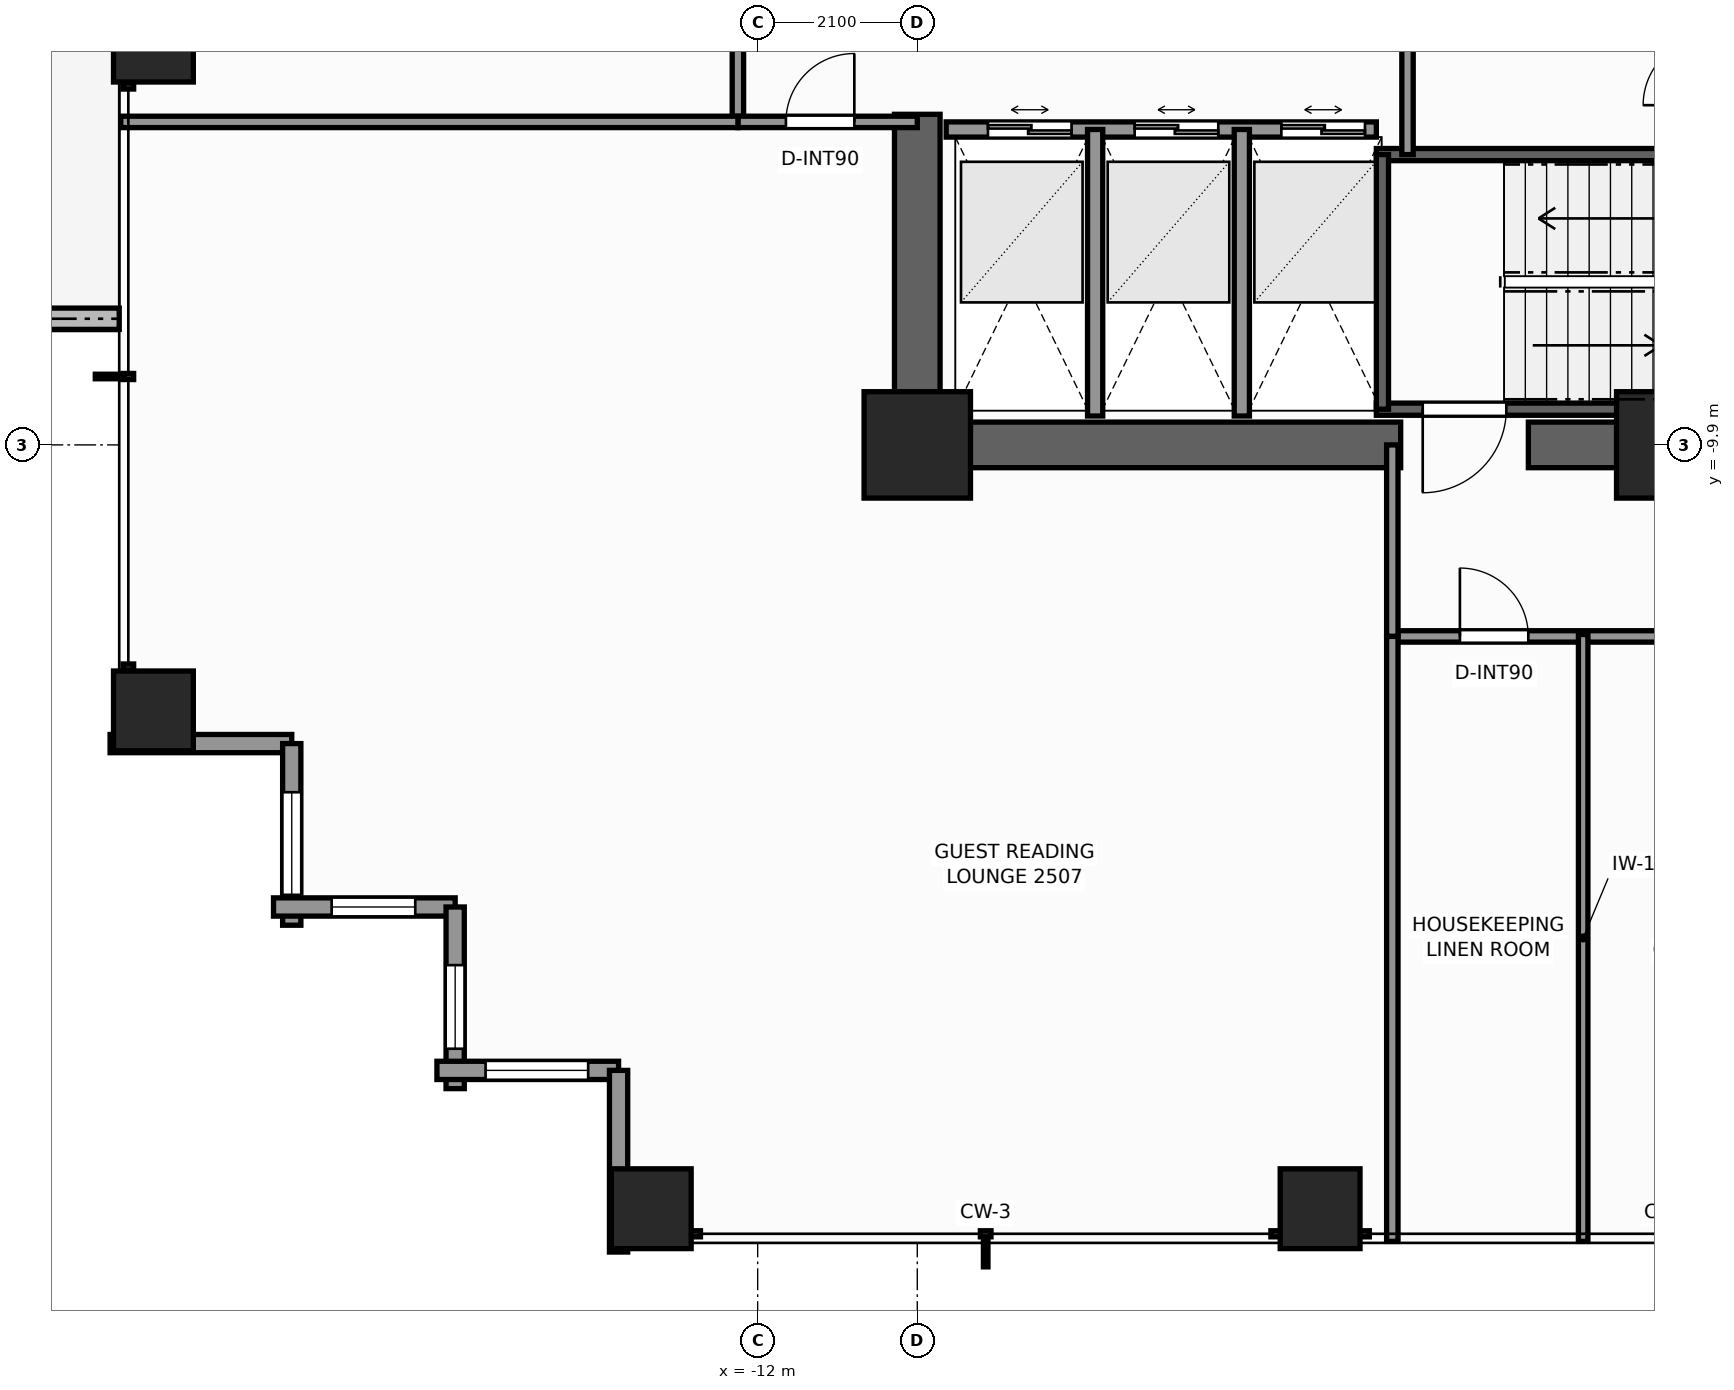
"""IFC4 building model, lengths in metres.
Left out: names, types, materials, properties, quantities, classifications, styles, units other than length and angle.
Written with IfcOpenShell. Run it as: python <this file> out.ifc"""

import sys

from ifc_helpers import new_model, si_unit, direction, frame, frame_2d, origin, origin_2d, place, context, subcontext, project, spatial, rectangle, extrude, element, fill, save


model = new_model("IFC4")
c1 = context("Model", 3, precision=1e-05, world=origin(), true_north=direction((0.0, 1.0)))
c2 = subcontext(c1, "Body", "Model", "MODEL_VIEW")
j1 = project(units=[si_unit("LENGTHUNIT", "METRE"), si_unit("PLANEANGLEUNIT", "RADIAN")], contexts=[c1])
p1 = place(None, origin())
s1 = spatial("IfcSite", under=j1, at=p1, CompositionType="ELEMENT")
p2 = place(p1, origin())
s2 = spatial("IfcBuilding", under=s1, at=p2, CompositionType="ELEMENT")
p3 = place(p2, frame((0.0, 0.0, 88.7)))
s3 = spatial("IfcBuildingStorey", under=s2, at=p3, CompositionType="ELEMENT", Elevation=88.7)
p4 = place(p3, frame((10.2, -9.9, 0.0), z_axis=(0.0, 0.0, 1.0), x_axis=(-1.0, 0.0, 0.0)))
e1 = element("IfcWall", 1, at=p4, inside=s3, PredefinedType="SHEAR", context=c2, shape_type="SweptSolid", body=[
    extrude(rectangle(XDim=12.06, YDim=0.6, at=frame_2d((6.03, 0.0))), origin(), (0.0, 0.0, 1.0), 3.3),
])
p5 = place(p3, frame((-3.54, -9.9, 0.0), z_axis=(0.0, 0.0, 1.0), x_axis=(-1.0, 0.0, 0.0)))
e2 = element("IfcWall", 2, at=p5, inside=s3, PredefinedType="SHEAR", context=c2, shape_type="SweptSolid", body=[
    extrude(rectangle(XDim=6.66, YDim=0.6, at=frame_2d((3.33, 0.0))), origin(), (0.0, 0.0, 1.0), 3.3),
])
p6 = place(p3, frame((-9.9, -9.6, 0.0), z_axis=(0.0, 0.0, 1.0), x_axis=(0.0, 1.0, 0.0)))
e3 = element("IfcWall", 3, at=p6, inside=s3, PredefinedType="SHEAR", context=c2, shape_type="SweptSolid", body=[
    extrude(rectangle(XDim=4.05, YDim=0.6, at=frame_2d((2.025, 0.0))), origin(), (0.0, 0.0, 1.0), 3.3),
])
for number, where, z_axis, x_axis in (
    (4, (-9.9, -9.9, 0.0), (0.0, 0.0, 1.0), (1.0, 0.0, 0.0)),
    (5, (0.0, -9.9, 0.0), (0.0, 0.0, 1.0), (1.0, 0.0, 0.0)),
):
    element("IfcColumn", number, at=place(p3, frame(where, z_axis=z_axis, x_axis=x_axis)), inside=s3, PredefinedType="COLUMN", context=c2, shape_type="SweptSolid", body=[
        extrude(rectangle(XDim=1.4, YDim=1.4, at=origin_2d()), origin(), (0.0, 0.0, 1.0), 3.3),
    ])
for number, where, z_axis, x_axis in (
    (6, (-13.4, -19.95, 0.0), (0.0, 0.0, 1.0), (1.0, 0.0, 0.0)),
    (7, (-4.6, -19.95, 0.0), (0.0, 0.0, 1.0), (1.0, 0.0, 0.0)),
    (8, (-19.95, -13.4, 0.0), (0.0, 0.0, 1.0), (1.0, 0.0, 0.0)),
    (9, (-19.95, -4.6, 0.0), (0.0, 0.0, 1.0), (1.0, 0.0, 0.0)),
):
    element("IfcColumn", number, at=place(p3, frame(where, z_axis=z_axis, x_axis=x_axis)), inside=s3, PredefinedType="COLUMN", context=c2, shape_type="SweptSolid", body=[
        extrude(rectangle(XDim=1.05, YDim=1.05, at=origin_2d()), origin(), (0.0, 0.0, 1.0), 3.3),
    ])
p7 = place(p3, frame((-21.66, -8.24, -0.04), z_axis=(0.0, 0.0, 1.0), x_axis=(1.0, 0.0, 0.0)))
e10 = element("IfcWall", 10, at=p7, inside=s3, PredefinedType="PARAPET", context=c2, shape_type="SweptSolid", body=[
    extrude(rectangle(XDim=1.26, YDim=0.28, at=frame_2d((0.63, 0.0))), origin(), (0.0, 0.0, 1.0), 0.42),
])
p8 = place(p3, frame((-18.13, -13.83, 0.0), z_axis=(0.0, 0.0, 1.0), x_axis=(-1.0, 0.0, 0.0)))
e11 = element("IfcWall", 11, at=p8, inside=s3, PredefinedType="STANDARD", context=c2, shape_type="SweptSolid", body=[
    extrude(rectangle(XDim=2.39, YDim=0.24, at=frame_2d((1.195, 0.0))), origin(), (0.0, 0.0, 1.0), 2.459),
])
p9 = place(p3, frame((-18.13, -16.22, 0.0), z_axis=(0.0, 0.0, 1.0), x_axis=(0.0, 1.0, 0.0)))
e12 = element("IfcWall", 12, at=p9, inside=s3, PredefinedType="STANDARD", context=c2, shape_type="SweptSolid", body=[
    extrude(rectangle(XDim=2.39, YDim=0.24, at=frame_2d((1.195, 0.0))), origin(), (0.0, 0.0, 1.0), 2.459),
])
p10 = place(p9, frame((0.4, 0.0, 0.65)))
e13 = element("IfcOpeningElement", 13, at=p10, cuts=e12, PredefinedType="OPENING", context=c2, shape_type="SweptSolid", body=[
    extrude(rectangle(XDim=1.35, YDim=1.55, at=frame_2d((0.675, 0.775))), frame((0.0, 0.13, 0.0), z_axis=(0.0, -1.0, 0.0), x_axis=(1.0, 0.0, 0.0)), (0.0, 0.0, 1.0), 0.26),
])
p11 = place(p3, frame((-15.98, -15.98, 0.0), z_axis=(0.0, 0.0, 1.0), x_axis=(-1.0, 0.0, 0.0)))
e14 = element("IfcWall", 14, at=p11, inside=s3, PredefinedType="STANDARD", context=c2, shape_type="SweptSolid", body=[
    extrude(rectangle(XDim=2.39, YDim=0.24, at=frame_2d((1.195, 0.0))), origin(), (0.0, 0.0, 1.0), 2.459),
])
p12 = place(p11, frame((0.525, 0.0, 0.65)))
e15 = element("IfcOpeningElement", 15, at=p12, cuts=e14, PredefinedType="OPENING", context=c2, shape_type="SweptSolid", body=[
    extrude(rectangle(XDim=1.1, YDim=1.45, at=frame_2d((0.55, 0.725))), frame((0.0, 0.13, 0.0), z_axis=(0.0, -1.0, 0.0), x_axis=(1.0, 0.0, 0.0)), (0.0, 0.0, 1.0), 0.26),
])
p13 = place(p3, frame((-15.98, -18.37, 0.0), z_axis=(0.0, 0.0, 1.0), x_axis=(0.0, 1.0, 0.0)))
e16 = element("IfcWall", 16, at=p13, inside=s3, PredefinedType="STANDARD", context=c2, shape_type="SweptSolid", body=[
    extrude(rectangle(XDim=2.39, YDim=0.24, at=frame_2d((1.195, 0.0))), origin(), (0.0, 0.0, 1.0), 2.459),
])
p14 = place(p13, frame((0.525, 0.0, 0.65)))
e17 = element("IfcOpeningElement", 17, at=p14, cuts=e16, PredefinedType="OPENING", context=c2, shape_type="SweptSolid", body=[
    extrude(rectangle(XDim=1.1, YDim=1.45, at=frame_2d((0.55, 0.725))), frame((0.0, 0.13, 0.0), z_axis=(0.0, -1.0, 0.0), x_axis=(1.0, 0.0, 0.0)), (0.0, 0.0, 1.0), 0.26),
])
p15 = place(p3, frame((-13.83, -18.13, 0.0), z_axis=(0.0, 0.0, 1.0), x_axis=(-1.0, 0.0, 0.0)))
e18 = element("IfcWall", 18, at=p15, inside=s3, PredefinedType="STANDARD", context=c2, shape_type="SweptSolid", body=[
    extrude(rectangle(XDim=2.39, YDim=0.24, at=frame_2d((1.195, 0.0))), origin(), (0.0, 0.0, 1.0), 2.459),
])
p16 = place(p15, frame((0.4, 0.0, 0.65)))
e19 = element("IfcOpeningElement", 19, at=p16, cuts=e18, PredefinedType="OPENING", context=c2, shape_type="SweptSolid", body=[
    extrude(rectangle(XDim=1.35, YDim=1.55, at=frame_2d((0.675, 0.775))), frame((0.0, 0.13, 0.0), z_axis=(0.0, -1.0, 0.0), x_axis=(1.0, 0.0, 0.0)), (0.0, 0.0, 1.0), 0.26),
])
p17 = place(p3, frame((-13.83, -20.52, 0.0), z_axis=(0.0, 0.0, 1.0), x_axis=(0.0, 1.0, 0.0)))
e20 = element("IfcWall", 20, at=p17, inside=s3, PredefinedType="STANDARD", context=c2, shape_type="SweptSolid", body=[
    extrude(rectangle(XDim=2.39, YDim=0.24, at=frame_2d((1.195, 0.0))), origin(), (0.0, 0.0, 1.0), 2.459),
])
p18 = place(p3, frame((3.86, -9.43, 0.0), z_axis=(0.0, 0.0, 1.0), x_axis=(-1.0, 0.0, 0.0)))
e21 = element("IfcWall", 21, at=p18, inside=s3, PredefinedType="SHEAR", context=c2, shape_type="SweptSolid", body=[
    extrude(rectangle(XDim=7.72, YDim=0.16, at=frame_2d((3.86, 0.0))), origin(), (0.0, 0.0, 1.0), 3.3),
])
p19 = place(p18, frame((6.01, 0.0, 0.0)))
e22 = element("IfcOpeningElement", 22, at=p19, cuts=e21, PredefinedType="OPENING", context=c2, shape_type="SweptSolid", body=[
    extrude(rectangle(XDim=1.1, YDim=2.2, at=frame_2d((0.55, 1.1))), frame((0.0, 0.09, 0.0), z_axis=(0.0, -1.0, 0.0), x_axis=(1.0, 0.0, 0.0)), (0.0, 0.0, 1.0), 0.18),
])
p20 = place(p3, frame((-3.86, -6.08, 0.0), z_axis=(0.0, 0.0, 1.0), x_axis=(1.0, 0.0, 0.0)))
e23 = element("IfcWall", 23, at=p20, inside=s3, PredefinedType="SHEAR", context=c2, shape_type="SweptSolid", body=[
    extrude(rectangle(XDim=7.72, YDim=0.16, at=frame_2d((3.86, 0.0))), origin(), (0.0, 0.0, 1.0), 3.3),
])
p21 = place(p3, frame((-3.78, -9.43, 0.0), z_axis=(0.0, 0.0, 1.0), x_axis=(0.0, 1.0, 0.0)))
e24 = element("IfcWall", 24, at=p21, inside=s3, PredefinedType="SHEAR", context=c2, shape_type="SweptSolid", body=[
    extrude(rectangle(XDim=3.35, YDim=0.16, at=frame_2d((1.675, 0.0))), origin(), (0.0, 0.0, 1.0), 3.3),
])
p22 = place(p3, frame((-9.52, -5.75, 0.0), z_axis=(0.0, 0.0, 1.0), x_axis=(1.0, 0.0, 0.0)))
e25 = element("IfcWall", 25, at=p22, inside=s3, PredefinedType="SOLIDWALL", context=c2, shape_type="SweptSolid", body=[
    extrude(rectangle(XDim=5.66, YDim=0.2, at=frame_2d((2.83, 0.0))), origin(), (0.0, 0.0, 1.0), 3.08),
])
p23 = place(p22, frame((0.55, 0.0, 0.0)))
e26 = element("IfcOpeningElement", 26, at=p23, cuts=e25, PredefinedType="OPENING", context=c2, shape_type="SweptSolid", body=[
    extrude(rectangle(XDim=1.1, YDim=2.2, at=frame_2d((0.55, 1.1))), frame((0.0, 0.11, 0.0), z_axis=(0.0, -1.0, 0.0), x_axis=(1.0, 0.0, 0.0)), (0.0, 0.0, 1.0), 0.22),
])
p24 = place(p22, frame((2.48, 0.0, 0.0)))
e27 = element("IfcOpeningElement", 27, at=p24, cuts=e25, PredefinedType="OPENING", context=c2, shape_type="SweptSolid", body=[
    extrude(rectangle(XDim=1.1, YDim=2.2, at=frame_2d((0.55, 1.1))), frame((0.0, 0.11, 0.0), z_axis=(0.0, -1.0, 0.0), x_axis=(1.0, 0.0, 0.0)), (0.0, 0.0, 1.0), 0.22),
])
p25 = place(p22, frame((4.41, 0.0, 0.0)))
e28 = element("IfcOpeningElement", 28, at=p25, cuts=e25, PredefinedType="OPENING", context=c2, shape_type="SweptSolid", body=[
    extrude(rectangle(XDim=1.1, YDim=2.2, at=frame_2d((0.55, 1.1))), frame((0.0, 0.11, 0.0), z_axis=(0.0, -1.0, 0.0), x_axis=(1.0, 0.0, 0.0)), (0.0, 0.0, 1.0), 0.22),
])
for number, where, z_axis, x_axis in (
    (29, (-7.56, -9.52, 0.0), (0.0, 0.0, 1.0), (0.0, 1.0, 0.0)),
    (30, (-5.63, -9.52, 0.0), (0.0, 0.0, 1.0), (0.0, 1.0, 0.0)),
):
    element("IfcWall", number, at=place(p3, frame(where, z_axis=z_axis, x_axis=x_axis)), inside=s3, PredefinedType="SOLIDWALL", context=c2, shape_type="SweptSolid", body=[
        extrude(rectangle(XDim=3.77, YDim=0.2, at=frame_2d((1.885, 0.0))), origin(), (0.0, 0.0, 1.0), 3.08),
    ])
p26 = place(p3, frame((-3.45, -6.08, 0.0), z_axis=(0.0, 0.0, 1.0), x_axis=(0.0, 1.0, 0.0)))
e31 = element("IfcWall", 31, at=p26, inside=s3, PredefinedType="PARTITIONING", context=c2, shape_type="SweptSolid", body=[
    extrude(rectangle(XDim=2.36, YDim=0.15, at=frame_2d((1.18, 0.0))), origin(), (0.0, 0.0, 1.0), 3.08),
])
p27 = place(p3, frame((-3.65, -12.42, 0.0), z_axis=(0.0, 0.0, 1.0), x_axis=(1.0, 0.0, 0.0)))
e32 = element("IfcWall", 32, at=p27, inside=s3, PredefinedType="PARTITIONING", context=c2, shape_type="SweptSolid", body=[
    extrude(rectangle(XDim=16.07, YDim=0.15, at=frame_2d((8.035, 0.0))), origin(), (0.0, 0.0, 1.0), 2.292),
])
p28 = place(p27, frame((0.889, 0.0, 0.0)))
e33 = element("IfcOpeningElement", 33, at=p28, cuts=e32, PredefinedType="OPENING", context=c2, shape_type="SweptSolid", body=[
    extrude(rectangle(XDim=0.9, YDim=2.06, at=frame_2d((0.45, 1.03))), frame((0.0, 0.085, 0.0), z_axis=(0.0, -1.0, 0.0), x_axis=(1.0, 0.0, 0.0)), (0.0, 0.0, 1.0), 0.17),
])
p29 = place(p27, frame((4.722, 0.0, 0.0)))
e34 = element("IfcOpeningElement", 34, at=p29, cuts=e32, PredefinedType="OPENING", context=c2, shape_type="SweptSolid", body=[
    extrude(rectangle(XDim=0.95, YDim=2.06, at=frame_2d((0.475, 1.03))), frame((0.0, 0.085, 0.0), z_axis=(0.0, -1.0, 0.0), x_axis=(1.0, 0.0, 0.0)), (0.0, 0.0, 1.0), 0.17),
])
p30 = place(p27, frame((9.415, 0.0, 0.0)))
e35 = element("IfcOpeningElement", 35, at=p30, cuts=e32, PredefinedType="OPENING", context=c2, shape_type="SweptSolid", body=[
    extrude(rectangle(XDim=0.9, YDim=2.06, at=frame_2d((0.45, 1.03))), frame((0.0, 0.085, 0.0), z_axis=(0.0, -1.0, 0.0), x_axis=(1.0, 0.0, 0.0)), (0.0, 0.0, 1.0), 0.17),
])
p31 = place(p27, frame((11.313, 0.0, 0.0)))
e36 = element("IfcOpeningElement", 36, at=p31, cuts=e32, PredefinedType="OPENING", context=c2, shape_type="SweptSolid", body=[
    extrude(rectangle(XDim=0.95, YDim=2.06, at=frame_2d((0.475, 1.03))), frame((0.0, 0.085, 0.0), z_axis=(0.0, -1.0, 0.0), x_axis=(1.0, 0.0, 0.0)), (0.0, 0.0, 1.0), 0.17),
])
p32 = place(p3, frame((-3.65, -12.42, 0.0), z_axis=(0.0, 0.0, 1.0), x_axis=(0.0, 1.0, 0.0)))
e37 = element("IfcWall", 37, at=p32, inside=s3, PredefinedType="PARTITIONING", context=c2, shape_type="SweptSolid", body=[
    extrude(rectangle(XDim=2.52, YDim=0.15, at=frame_2d((1.26, 0.0))), origin(), (0.0, 0.0, 1.0), 3.08),
])
p33 = place(p3, frame((-12.26, -5.65, 0.0), z_axis=(0.0, 0.0, 1.0), x_axis=(0.0, 1.0, 0.0)))
e38 = element("IfcWall", 38, at=p33, inside=s3, PredefinedType="PARTITIONING", context=c2, shape_type="SweptSolid", body=[
    extrude(rectangle(XDim=3.6, YDim=0.15, at=frame_2d((1.8, 0.0))), origin(), (0.0, 0.0, 1.0), 2.292),
])
p34 = place(p33, frame((2.156, 0.0, 0.0)))
e39 = element("IfcOpeningElement", 39, at=p34, cuts=e38, PredefinedType="OPENING", context=c2, shape_type="SweptSolid", body=[
    extrude(rectangle(XDim=0.9, YDim=2.06, at=frame_2d((0.45, 1.03))), frame((0.0, 0.085, 0.0), z_axis=(0.0, -1.0, 0.0), x_axis=(1.0, 0.0, 0.0)), (0.0, 0.0, 1.0), 0.17),
])
p35 = place(p3, frame((-12.26, -5.65, 0.0), z_axis=(0.0, 0.0, 1.0), x_axis=(1.0, 0.0, 0.0)))
e40 = element("IfcWall", 40, at=p35, inside=s3, PredefinedType="PARTITIONING", context=c2, shape_type="SweptSolid", body=[
    extrude(rectangle(XDim=2.36, YDim=0.15, at=frame_2d((1.18, 0.0))), origin(), (0.0, 0.0, 1.0), 3.08),
])
p36 = place(p35, frame((0.632, 0.0, 0.0)))
e41 = element("IfcOpeningElement", 41, at=p36, cuts=e40, PredefinedType="OPENING", context=c2, shape_type="SweptSolid", body=[
    extrude(rectangle(XDim=0.9, YDim=2.06, at=frame_2d((0.45, 1.03))), frame((0.0, 0.085, 0.0), z_axis=(0.0, -1.0, 0.0), x_axis=(1.0, 0.0, 0.0)), (0.0, 0.0, 1.0), 0.17),
])
p37 = place(p3, frame((-20.38, -5.65, 0.0), z_axis=(0.0, 0.0, 1.0), x_axis=(1.0, 0.0, 0.0)))
e42 = element("IfcWall", 42, at=p37, inside=s3, PredefinedType="PARTITIONING", context=c2, shape_type="SweptSolid", body=[
    extrude(rectangle(XDim=8.12, YDim=0.15, at=frame_2d((4.06, 0.0))), origin(), (0.0, 0.0, 1.0), 2.449),
])
p38 = place(p3, frame((-3.65, -20.38, 0.0), z_axis=(0.0, 0.0, 1.0), x_axis=(0.0, 1.0, 0.0)))
e43 = element("IfcWall", 43, at=p38, inside=s3, PredefinedType="PARTITIONING", context=c2, shape_type="SweptSolid", body=[
    extrude(rectangle(XDim=7.96, YDim=0.15, at=frame_2d((3.98, 0.0))), origin(), (0.0, 0.0, 1.0), 2.449),
])
p39 = place(p3, frame((-1.139, -20.38, 0.0), z_axis=(0.0, 0.0, 1.0), x_axis=(0.0, 1.0, 0.0)))
e44 = element("IfcWall", 44, at=p39, inside=s3, PredefinedType="PARTITIONING", context=c2, shape_type="SweptSolid", body=[
    extrude(rectangle(XDim=7.985, YDim=0.125, at=frame_2d((3.992, 0.0))), origin(), (0.0, 0.0, 1.0), 2.449),
])
p40 = place(p10, origin())
e45 = element("IfcWindow", 45, at=p40, inside=s3, PartitioningType="SINGLE_PANEL", PredefinedType="WINDOW", context=c2, shape_type="SweptSolid", body=[
    extrude(rectangle(XDim=1.35, YDim=1.55, at=frame_2d((0.675, 0.775))), frame((0.0, 0.03, 0.0), z_axis=(0.0, -1.0, 0.0), x_axis=(1.0, 0.0, 0.0)), (0.0, 0.0, 1.0), 0.06),
])
fill(e13, e45)
p41 = place(p12, origin())
e46 = element("IfcWindow", 46, at=p41, inside=s3, PartitioningType="SINGLE_PANEL", PredefinedType="WINDOW", context=c2, shape_type="SweptSolid", body=[
    extrude(rectangle(XDim=1.1, YDim=1.45, at=frame_2d((0.55, 0.725))), frame((0.0, 0.03, 0.0), z_axis=(0.0, -1.0, 0.0), x_axis=(1.0, 0.0, 0.0)), (0.0, 0.0, 1.0), 0.06),
])
fill(e15, e46)
p42 = place(p14, origin())
e47 = element("IfcWindow", 47, at=p42, inside=s3, PartitioningType="SINGLE_PANEL", PredefinedType="WINDOW", context=c2, shape_type="SweptSolid", body=[
    extrude(rectangle(XDim=1.1, YDim=1.45, at=frame_2d((0.55, 0.725))), frame((0.0, 0.03, 0.0), z_axis=(0.0, -1.0, 0.0), x_axis=(1.0, 0.0, 0.0)), (0.0, 0.0, 1.0), 0.06),
])
fill(e17, e47)
p43 = place(p16, origin())
e48 = element("IfcWindow", 48, at=p43, inside=s3, PartitioningType="SINGLE_PANEL", PredefinedType="WINDOW", context=c2, shape_type="SweptSolid", body=[
    extrude(rectangle(XDim=1.35, YDim=1.55, at=frame_2d((0.675, 0.775))), frame((0.0, 0.03, 0.0), z_axis=(0.0, -1.0, 0.0), x_axis=(1.0, 0.0, 0.0)), (0.0, 0.0, 1.0), 0.06),
])
fill(e19, e48)
p44 = place(p19, origin())
e49 = element("IfcDoor", 49, at=p44, inside=s3, OperationType="SINGLE_SWING_RIGHT", PredefinedType="DOOR", context=c2, shape_type="SweptSolid", body=[
    extrude(rectangle(XDim=1.1, YDim=2.2, at=frame_2d((0.55, 1.1))), frame((0.0, 0.025, 0.0), z_axis=(0.0, -1.0, 0.0), x_axis=(1.0, 0.0, 0.0)), (0.0, 0.0, 1.0), 0.05),
])
fill(e22, e49)
p45 = place(p23, origin())
e50 = element("IfcDoor", 50, at=p45, inside=s3, OperationType="DOUBLE_DOOR_SLIDING", PredefinedType="DOOR", context=c2, shape_type="SweptSolid", body=[
    extrude(rectangle(XDim=1.1, YDim=2.2, at=frame_2d((0.55, 1.1))), frame((0.0, 0.025, 0.0), z_axis=(0.0, -1.0, 0.0), x_axis=(1.0, 0.0, 0.0)), (0.0, 0.0, 1.0), 0.05),
])
fill(e26, e50)
p46 = place(p24, origin())
e51 = element("IfcDoor", 51, at=p46, inside=s3, OperationType="DOUBLE_DOOR_SLIDING", PredefinedType="DOOR", context=c2, shape_type="SweptSolid", body=[
    extrude(rectangle(XDim=1.1, YDim=2.2, at=frame_2d((0.55, 1.1))), frame((0.0, 0.025, 0.0), z_axis=(0.0, -1.0, 0.0), x_axis=(1.0, 0.0, 0.0)), (0.0, 0.0, 1.0), 0.05),
])
fill(e27, e51)
p47 = place(p25, origin())
e52 = element("IfcDoor", 52, at=p47, inside=s3, OperationType="DOUBLE_DOOR_SLIDING", PredefinedType="DOOR", context=c2, shape_type="SweptSolid", body=[
    extrude(rectangle(XDim=1.1, YDim=2.2, at=frame_2d((0.55, 1.1))), frame((0.0, 0.025, 0.0), z_axis=(0.0, -1.0, 0.0), x_axis=(1.0, 0.0, 0.0)), (0.0, 0.0, 1.0), 0.05),
])
fill(e28, e52)
p48 = place(p36, origin())
e53 = element("IfcDoor", 53, at=p48, inside=s3, OperationType="SINGLE_SWING_RIGHT", PredefinedType="DOOR", context=c2, shape_type="SweptSolid", body=[
    extrude(rectangle(XDim=0.9, YDim=2.06, at=frame_2d((0.45, 1.03))), frame((0.0, 0.025, 0.0), z_axis=(0.0, -1.0, 0.0), x_axis=(1.0, 0.0, 0.0)), (0.0, 0.0, 1.0), 0.05),
])
fill(e41, e53)
p49 = place(p28, origin())
e54 = element("IfcDoor", 54, at=p49, inside=s3, OperationType="SINGLE_SWING_LEFT", PredefinedType="DOOR", context=c2, shape_type="SweptSolid", body=[
    extrude(rectangle(XDim=0.9, YDim=2.06, at=frame_2d((0.45, 1.03))), frame((0.0, 0.025, 0.0), z_axis=(0.0, -1.0, 0.0), x_axis=(1.0, 0.0, 0.0)), (0.0, 0.0, 1.0), 0.05),
])
fill(e33, e54)
save(model, sys.argv[1])
